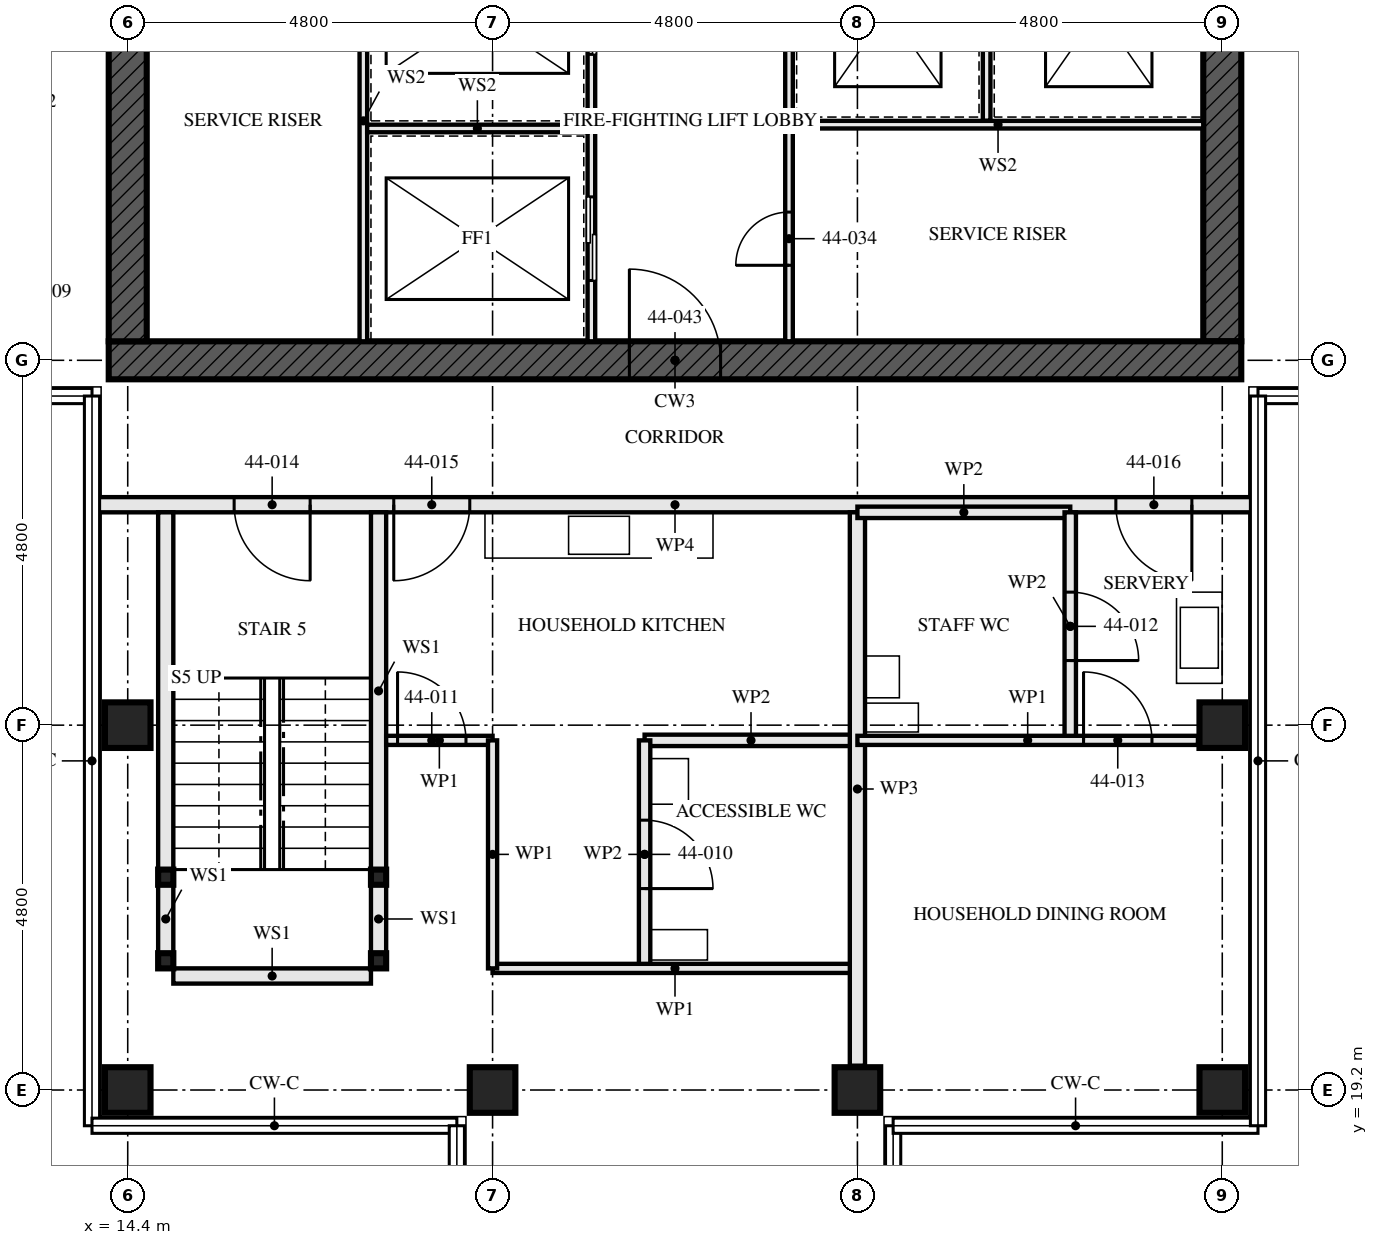
"""IFC4 building model, lengths in metres.
Left out: names, types, materials, properties, quantities, classifications, styles, units other than length and angle.
Written with IfcOpenShell. Run it as: python <this file> out.ifc"""

import sys

from ifc_helpers import new_model, si_unit, direction, frame, frame_2d, origin, origin_2d, place, context, subcontext, project, spatial, rectangle, hollow_rectangle, extrude, element, fill, save


model = new_model("IFC4")
c1 = context("Model", 3, precision=1e-05, world=origin(), true_north=direction((0.0, 1.0)))
c2 = subcontext(c1, "Body", "Model", "MODEL_VIEW")
j1 = project(units=[si_unit("LENGTHUNIT", "METRE"), si_unit("PLANEANGLEUNIT", "RADIAN")], contexts=[c1])
p1 = place(None, origin())
s1 = spatial("IfcSite", under=j1, at=p1, CompositionType="ELEMENT")
p2 = place(p1, origin())
s2 = spatial("IfcBuilding", under=s1, at=p2, CompositionType="ELEMENT")
p3 = place(p2, frame((0.0, 0.0, 162.0)))
s3 = spatial("IfcBuildingStorey", under=s2, at=p3, CompositionType="ELEMENT", Elevation=162.0)
p4 = place(p3, frame((14.4, 19.2, 0.0), z_axis=(0.0, 0.0, 1.0), x_axis=(0.0, 1.0, 0.0)))
e1 = element("IfcColumn", 1, at=p4, inside=s3, PredefinedType="COLUMN", context=c2, shape_type="SweptSolid", body=[
    extrude(hollow_rectangle(XDim=0.6, YDim=0.6, WallThickness=0.06, at=origin_2d()), origin(), (0.0, 0.0, 1.0), 3.5),
])
p5 = place(p3, frame((14.4, 24.0, 0.0), z_axis=(0.0, 0.0, 1.0), x_axis=(1.0, 0.0, 0.0)))
e2 = element("IfcColumn", 2, at=p5, inside=s3, PredefinedType="COLUMN", context=c2, shape_type="SweptSolid", body=[
    extrude(hollow_rectangle(XDim=0.6, YDim=0.6, WallThickness=0.08, at=origin_2d()), origin(), (0.0, 0.0, 1.0), 3.5),
])
for number, where, z_axis, x_axis in (
    (3, (19.2, 19.2, 0.0), (0.0, 0.0, 1.0), (0.0, 1.0, 0.0)),
    (4, (24.0, 19.2, 0.0), (0.0, 0.0, 1.0), (0.0, 1.0, 0.0)),
    (5, (28.8, 19.2, 0.0), (0.0, 0.0, 1.0), (0.0, 1.0, 0.0)),
):
    element("IfcColumn", number, at=place(p3, frame(where, z_axis=z_axis, x_axis=x_axis)), inside=s3, PredefinedType="COLUMN", context=c2, shape_type="SweptSolid", body=[
        extrude(hollow_rectangle(XDim=0.6, YDim=0.6, WallThickness=0.06, at=origin_2d()), origin(), (0.0, 0.0, 1.0), 3.5),
    ])
p6 = place(p3, frame((28.8, 24.0, 0.0), z_axis=(0.0, 0.0, 1.0), x_axis=(1.0, 0.0, 0.0)))
e6 = element("IfcColumn", 6, at=p6, inside=s3, PredefinedType="COLUMN", context=c2, shape_type="SweptSolid", body=[
    extrude(hollow_rectangle(XDim=0.6, YDim=0.6, WallThickness=0.08, at=origin_2d()), origin(), (0.0, 0.0, 1.0), 3.5),
])
p7 = place(p3, frame((14.15, 28.8, -0.17), z_axis=(0.0, 0.0, 1.0), x_axis=(1.0, 0.0, 0.0)))
e7 = element("IfcWall", 7, at=p7, inside=s3, PredefinedType="SHEAR", context=c2, shape_type="SweptSolid", body=[
    extrude(rectangle(XDim=14.9, YDim=0.5, at=frame_2d((7.45, 0.0))), origin(), (0.0, 0.0, 1.0), 3.5),
])
p8 = place(p7, frame((6.85, 0.0, 0.17)))
e8 = element("IfcOpeningElement", 8, at=p8, cuts=e7, PredefinedType="OPENING", context=c2, shape_type="SweptSolid", body=[
    extrude(rectangle(XDim=1.2, YDim=2.1, at=frame_2d((0.6, 1.05))), frame((0.0, 0.26, 0.0), z_axis=(0.0, -1.0, 0.0), x_axis=(1.0, 0.0, 0.0)), (0.0, 0.0, 1.0), 0.521),
])
p9 = place(p3, frame((14.4, 42.95, -0.17), z_axis=(0.0, 0.0, 1.0), x_axis=(0.0, -1.0, 0.0)))
e9 = element("IfcWall", 9, at=p9, inside=s3, PredefinedType="SHEAR", context=c2, shape_type="SweptSolid", body=[
    extrude(rectangle(XDim=13.9, YDim=0.5, at=frame_2d((6.95, 0.0))), origin(), (0.0, 0.0, 1.0), 3.5),
])
p10 = place(p9, frame((6.35, 0.0, 0.17)))
e10 = element("IfcOpeningElement", 10, at=p10, cuts=e9, PredefinedType="OPENING", context=c2, shape_type="SweptSolid", body=[
    extrude(rectangle(XDim=1.2, YDim=2.1, at=frame_2d((0.6, 1.05))), frame((0.0, 0.26, 0.0), z_axis=(0.0, -1.0, 0.0), x_axis=(1.0, 0.0, 0.0)), (0.0, 0.0, 1.0), 0.521),
])
p11 = place(p3, frame((28.8, 29.05, -0.17), z_axis=(0.0, 0.0, 1.0), x_axis=(0.0, 1.0, 0.0)))
e11 = element("IfcWall", 11, at=p11, inside=s3, PredefinedType="SHEAR", context=c2, shape_type="SweptSolid", body=[
    extrude(rectangle(XDim=13.9, YDim=0.5, at=frame_2d((6.95, 0.0))), origin(), (0.0, 0.0, 1.0), 3.5),
])
p12 = place(p11, frame((6.35, 0.0, 0.17)))
e12 = element("IfcOpeningElement", 12, at=p12, cuts=e11, PredefinedType="OPENING", context=c2, shape_type="SweptSolid", body=[
    extrude(rectangle(XDim=1.2, YDim=2.1, at=frame_2d((0.6, 1.05))), frame((0.0, 0.26, 0.0), z_axis=(0.0, -1.0, 0.0), x_axis=(1.0, 0.0, 0.0)), (0.0, 0.0, 1.0), 0.521),
])
for number, where, z_axis, x_axis in (
    (13, (14.9, 20.9, 0.0), (0.0, 0.0, 1.0), (1.0, 0.0, 0.0)),
    (14, (17.7, 20.9, 0.0), (0.0, 0.0, 1.0), (1.0, 0.0, 0.0)),
    (15, (14.9, 22.0, 0.0), (0.0, 0.0, 1.0), (1.0, 0.0, 0.0)),
    (16, (17.7, 22.0, 0.0), (0.0, 0.0, 1.0), (1.0, 0.0, 0.0)),
):
    element("IfcColumn", number, at=place(p3, frame(where, z_axis=z_axis, x_axis=x_axis)), inside=s3, PredefinedType="COLUMN", context=c2, shape_type="SweptSolid", body=[
        extrude(hollow_rectangle(XDim=0.2, YDim=0.2, WallThickness=0.008, at=origin_2d()), origin(), (0.0, 0.0, 1.0), 3.33),
    ])
p13 = place(p3, frame((14.9, 21.0, 0.0), z_axis=(0.0, 0.0, 1.0), x_axis=(0.0, 1.0, 0.0)))
e17 = element("IfcWall", 17, at=p13, inside=s3, PredefinedType="SOLIDWALL", context=c2, shape_type="SweptSolid", body=[
    extrude(rectangle(XDim=0.9, YDim=0.2, at=frame_2d((0.45, 0.0))), origin(), (0.0, 0.0, 1.0), 2.99),
])
p14 = place(p3, frame((14.9, 22.1, 0.0), z_axis=(0.0, 0.0, 1.0), x_axis=(0.0, 1.0, 0.0)))
e18 = element("IfcWall", 18, at=p14, inside=s3, PredefinedType="SOLIDWALL", context=c2, shape_type="SweptSolid", body=[
    extrude(rectangle(XDim=4.7, YDim=0.2, at=frame_2d((2.35, 0.0))), origin(), (0.0, 0.0, 1.0), 2.99),
])
p15 = place(p3, frame((17.7, 21.0, 0.0), z_axis=(0.0, 0.0, 1.0), x_axis=(0.0, 1.0, 0.0)))
e19 = element("IfcWall", 19, at=p15, inside=s3, PredefinedType="SOLIDWALL", context=c2, shape_type="SweptSolid", body=[
    extrude(rectangle(XDim=0.9, YDim=0.2, at=frame_2d((0.45, 0.0))), origin(), (0.0, 0.0, 1.0), 2.99),
])
p16 = place(p3, frame((17.7, 22.1, 0.0), z_axis=(0.0, 0.0, 1.0), x_axis=(0.0, 1.0, 0.0)))
e20 = element("IfcWall", 20, at=p16, inside=s3, PredefinedType="SOLIDWALL", context=c2, shape_type="SweptSolid", body=[
    extrude(rectangle(XDim=4.7, YDim=0.2, at=frame_2d((2.35, 0.0))), origin(), (0.0, 0.0, 1.0), 2.99),
])
p17 = place(p3, frame((15.0, 20.7, 0.0), z_axis=(0.0, 0.0, 1.0), x_axis=(1.0, 0.0, 0.0)))
e21 = element("IfcWall", 21, at=p17, inside=s3, PredefinedType="SOLIDWALL", context=c2, shape_type="SweptSolid", body=[
    extrude(rectangle(XDim=2.6, YDim=0.2, at=frame_2d((1.3, 0.0))), origin(), (0.0, 0.0, 1.0), 3.33),
])
p18 = place(p3, frame((21.2, 20.8, 0.0), z_axis=(0.0, 0.0, 1.0), x_axis=(0.0, 1.0, 0.0)))
e22 = element("IfcWall", 22, at=p18, inside=s3, PredefinedType="PARTITIONING", context=c2, shape_type="SweptSolid", body=[
    extrude(rectangle(XDim=3.0, YDim=0.15, at=frame_2d((1.5, 0.0))), origin(), (0.0, 0.0, 1.0), 3.33),
])
p19 = place(p18, frame((1.05, 0.0, 0.0)))
e23 = element("IfcOpeningElement", 23, at=p19, cuts=e22, PredefinedType="OPENING", context=c2, shape_type="SweptSolid", body=[
    extrude(rectangle(XDim=0.9, YDim=2.1, at=frame_2d((0.45, 1.05))), frame((0.0, 0.085, 0.0), z_axis=(0.0, -1.0, 0.0), x_axis=(1.0, 0.0, 0.0)), (0.0, 0.0, 1.0), 0.171),
])
p20 = place(p3, frame((21.2, 23.8, 0.0), z_axis=(0.0, 0.0, 1.0), x_axis=(1.0, 0.0, 0.0)))
e24 = element("IfcWall", 24, at=p20, inside=s3, PredefinedType="PARTITIONING", context=c2, shape_type="SweptSolid", body=[
    extrude(rectangle(XDim=2.8, YDim=0.15, at=frame_2d((1.4, 0.0))), origin(), (0.0, 0.0, 1.0), 3.33),
])
p21 = place(p3, frame((17.8, 23.8, 0.0), z_axis=(0.0, 0.0, 1.0), x_axis=(1.0, 0.0, 0.0)))
e25 = element("IfcWall", 25, at=p21, inside=s3, PredefinedType="PARTITIONING", context=c2, shape_type="SweptSolid", body=[
    extrude(rectangle(XDim=1.4, YDim=0.12, at=frame_2d((0.7, 0.0))), origin(), (0.0, 0.0, 1.0), 3.33),
])
p22 = place(p21, frame((0.15, 0.0, 0.0)))
e26 = element("IfcOpeningElement", 26, at=p22, cuts=e25, PredefinedType="OPENING", context=c2, shape_type="SweptSolid", body=[
    extrude(rectangle(XDim=0.9, YDim=2.1, at=frame_2d((0.45, 1.05))), frame((0.0, 0.071, 0.0), z_axis=(0.0, -1.0, 0.0), x_axis=(1.0, 0.0, 0.0)), (0.0, 0.0, 1.0), 0.141),
])
p23 = place(p3, frame((19.2, 20.8, 0.0), z_axis=(0.0, 0.0, 1.0), x_axis=(1.0, 0.0, 0.0)))
e27 = element("IfcWall", 27, at=p23, inside=s3, PredefinedType="PARTITIONING", context=c2, shape_type="SweptSolid", body=[
    extrude(rectangle(XDim=4.8, YDim=0.12, at=frame_2d((2.4, 0.0))), origin(), (0.0, 0.0, 1.0), 3.33),
])
p24 = place(p3, frame((19.2, 20.8, 0.0), z_axis=(0.0, 0.0, 1.0), x_axis=(0.0, 1.0, 0.0)))
e28 = element("IfcWall", 28, at=p24, inside=s3, PredefinedType="PARTITIONING", context=c2, shape_type="SweptSolid", body=[
    extrude(rectangle(XDim=3.0, YDim=0.12, at=frame_2d((1.5, 0.0))), origin(), (0.0, 0.0, 1.0), 2.55),
])
p25 = place(p3, frame((24.0, 19.52, 0.0), z_axis=(0.0, 0.0, 1.0), x_axis=(0.0, 1.0, 0.0)))
e29 = element("IfcWall", 29, at=p25, inside=s3, PredefinedType="PARTITIONING", context=c2, shape_type="SweptSolid", body=[
    extrude(rectangle(XDim=7.28, YDim=0.2, at=frame_2d((3.64, 0.0))), origin(), (0.0, 0.0, 1.0), 2.55),
])
p26 = place(p3, frame((26.8, 23.8, 0.0), z_axis=(0.0, 0.0, 1.0), x_axis=(0.0, 1.0, 0.0)))
e30 = element("IfcWall", 30, at=p26, inside=s3, PredefinedType="PARTITIONING", context=c2, shape_type="SweptSolid", body=[
    extrude(rectangle(XDim=3.0, YDim=0.15, at=frame_2d((1.5, 0.0))), origin(), (0.0, 0.0, 1.0), 2.55),
])
p27 = place(p26, frame((1.05, 0.0, 0.0)))
e31 = element("IfcOpeningElement", 31, at=p27, cuts=e30, PredefinedType="OPENING", context=c2, shape_type="SweptSolid", body=[
    extrude(rectangle(XDim=0.9, YDim=2.1, at=frame_2d((0.45, 1.05))), frame((0.0, 0.085, 0.0), z_axis=(0.0, -1.0, 0.0), x_axis=(1.0, 0.0, 0.0)), (0.0, 0.0, 1.0), 0.171),
])
p28 = place(p3, frame((24.0, 26.8, 0.0), z_axis=(0.0, 0.0, 1.0), x_axis=(1.0, 0.0, 0.0)))
e32 = element("IfcWall", 32, at=p28, inside=s3, PredefinedType="PARTITIONING", context=c2, shape_type="SweptSolid", body=[
    extrude(rectangle(XDim=2.8, YDim=0.15, at=frame_2d((1.4, 0.0))), origin(), (0.0, 0.0, 1.0), 3.33),
])
p29 = place(p3, frame((24.0, 23.8, 0.0), z_axis=(0.0, 0.0, 1.0), x_axis=(1.0, 0.0, 0.0)))
e33 = element("IfcWall", 33, at=p29, inside=s3, PredefinedType="PARTITIONING", context=c2, shape_type="SweptSolid", body=[
    extrude(rectangle(XDim=4.48, YDim=0.12, at=frame_2d((2.24, 0.0))), origin(), (0.0, 0.0, 1.0), 3.33),
])
p30 = place(p29, frame((2.975, 0.0, 0.0)))
e34 = element("IfcOpeningElement", 34, at=p30, cuts=e33, PredefinedType="OPENING", context=c2, shape_type="SweptSolid", body=[
    extrude(rectangle(XDim=0.9, YDim=2.1, at=frame_2d((0.45, 1.05))), frame((0.0, 0.071, 0.0), z_axis=(0.0, -1.0, 0.0), x_axis=(1.0, 0.0, 0.0)), (0.0, 0.0, 1.0), 0.141),
])
p31 = place(p3, frame((13.95, 26.9, 0.0), z_axis=(0.0, 0.0, 1.0), x_axis=(1.0, 0.0, 0.0)))
e35 = element("IfcWall", 35, at=p31, inside=s3, PredefinedType="PARTITIONING", context=c2, shape_type="SweptSolid", body=[
    extrude(rectangle(XDim=15.3, YDim=0.2, at=frame_2d((7.65, 0.0))), origin(), (0.0, 0.0, 1.0), 2.32),
])
p32 = place(p31, frame((1.85, 0.0, 0.0)))
e36 = element("IfcOpeningElement", 36, at=p32, cuts=e35, PredefinedType="OPENING", context=c2, shape_type="SweptSolid", body=[
    extrude(rectangle(XDim=1.0, YDim=2.1, at=frame_2d((0.5, 1.05))), frame((0.0, 0.111, 0.0), z_axis=(0.0, -1.0, 0.0), x_axis=(1.0, 0.0, 0.0)), (0.0, 0.0, 1.0), 0.221),
])
p33 = place(p31, frame((3.95, 0.0, 0.0)))
e37 = element("IfcOpeningElement", 37, at=p33, cuts=e35, PredefinedType="OPENING", context=c2, shape_type="SweptSolid", body=[
    extrude(rectangle(XDim=1.0, YDim=2.1, at=frame_2d((0.5, 1.05))), frame((0.0, 0.111, 0.0), z_axis=(0.0, -1.0, 0.0), x_axis=(1.0, 0.0, 0.0)), (0.0, 0.0, 1.0), 0.221),
])
p34 = place(p31, frame((13.45, 0.0, 0.0)))
e38 = element("IfcOpeningElement", 38, at=p34, cuts=e35, PredefinedType="OPENING", context=c2, shape_type="SweptSolid", body=[
    extrude(rectangle(XDim=1.0, YDim=2.1, at=frame_2d((0.5, 1.05))), frame((0.0, 0.111, 0.0), z_axis=(0.0, -1.0, 0.0), x_axis=(1.0, 0.0, 0.0)), (0.0, 0.0, 1.0), 0.221),
])
p35 = place(p3, frame((20.5, 29.05, 0.0), z_axis=(0.0, 0.0, 1.0), x_axis=(0.0, 1.0, 0.0)))
e39 = element("IfcWall", 39, at=p35, inside=s3, PredefinedType="SOLIDWALL", context=c2, shape_type="SweptSolid", body=[
    extrude(rectangle(XDim=5.8, YDim=0.1, at=frame_2d((2.9, 0.0))), origin(), (0.0, 0.0, 1.0), 3.33),
])
p36 = place(p35, frame((0.8, 0.0, 0.0)))
e40 = element("IfcOpeningElement", 40, at=p36, cuts=e39, PredefinedType="OPENING", context=c2, shape_type="SweptSolid", body=[
    extrude(rectangle(XDim=1.1, YDim=2.3, at=frame_2d((0.55, 1.15))), frame((0.0, 0.061, 0.0), z_axis=(0.0, -1.0, 0.0), x_axis=(1.0, 0.0, 0.0)), (0.0, 0.0, 1.0), 0.121),
])
p37 = place(p35, frame((3.775, 0.0, 0.0)))
e41 = element("IfcOpeningElement", 41, at=p37, cuts=e39, PredefinedType="OPENING", context=c2, shape_type="SweptSolid", body=[
    extrude(rectangle(XDim=1.1, YDim=2.3, at=frame_2d((0.55, 1.15))), frame((0.0, 0.061, 0.0), z_axis=(0.0, -1.0, 0.0), x_axis=(1.0, 0.0, 0.0)), (0.0, 0.0, 1.0), 0.121),
])
p38 = place(p3, frame((23.1, 29.05, 0.0), z_axis=(0.0, 0.0, 1.0), x_axis=(0.0, 1.0, 0.0)))
e42 = element("IfcWall", 42, at=p38, inside=s3, PredefinedType="SOLIDWALL", context=c2, shape_type="SweptSolid", body=[
    extrude(rectangle(XDim=5.8, YDim=0.1, at=frame_2d((2.9, 0.0))), origin(), (0.0, 0.0, 1.0), 3.33),
])
p39 = place(p38, frame((1.0, 0.0, 0.0)))
e43 = element("IfcOpeningElement", 43, at=p39, cuts=e42, PredefinedType="OPENING", context=c2, shape_type="SweptSolid", body=[
    extrude(rectangle(XDim=0.7, YDim=2.1, at=frame_2d((0.35, 1.05))), frame((0.0, 0.061, 0.0), z_axis=(0.0, -1.0, 0.0), x_axis=(1.0, 0.0, 0.0)), (0.0, 0.0, 1.0), 0.121),
])
p40 = place(p3, frame((17.5, 29.05, 0.0), z_axis=(0.0, 0.0, 1.0), x_axis=(0.0, 1.0, 0.0)))
e44 = element("IfcWall", 44, at=p40, inside=s3, PredefinedType="SOLIDWALL", context=c2, shape_type="SweptSolid", body=[
    extrude(rectangle(XDim=5.8, YDim=0.1, at=frame_2d((2.9, 0.0))), origin(), (0.0, 0.0, 1.0), 3.33),
])
p41 = place(p3, frame((17.55, 31.85, 0.0), z_axis=(0.0, 0.0, 1.0), x_axis=(1.0, 0.0, 0.0)))
e45 = element("IfcWall", 45, at=p41, inside=s3, PredefinedType="SOLIDWALL", context=c2, shape_type="SweptSolid", body=[
    extrude(rectangle(XDim=2.9, YDim=0.1, at=frame_2d((1.45, 0.0))), origin(), (0.0, 0.0, 1.0), 3.33),
])
p42 = place(p3, frame((25.7, 31.95, 0.0), z_axis=(0.0, 0.0, 1.0), x_axis=(0.0, 1.0, 0.0)))
e46 = element("IfcWall", 46, at=p42, inside=s3, PredefinedType="SOLIDWALL", context=c2, shape_type="SweptSolid", body=[
    extrude(rectangle(XDim=2.9, YDim=0.1, at=frame_2d((1.45, 0.0))), origin(), (0.0, 0.0, 1.0), 3.33),
])
p43 = place(p3, frame((23.15, 31.9, 0.0), z_axis=(0.0, 0.0, 1.0), x_axis=(1.0, 0.0, 0.0)))
e47 = element("IfcWall", 47, at=p43, inside=s3, PredefinedType="SOLIDWALL", context=c2, shape_type="SweptSolid", body=[
    extrude(rectangle(XDim=5.4, YDim=0.1, at=frame_2d((2.7, 0.0))), origin(), (0.0, 0.0, 1.0), 3.33),
])
p44 = place(p19, frame((0.9, 0.0, 0.0), z_axis=(0.0, 0.0, 1.0), x_axis=(-1.0, 0.0, 0.0)))
e48 = element("IfcDoor", 48, at=p44, inside=s3, OperationType="SINGLE_SWING_LEFT", PredefinedType="DOOR", context=c2, shape_type="SweptSolid", body=[
    extrude(rectangle(XDim=0.9, YDim=2.1, at=frame_2d((0.45, 1.05))), frame((0.0, 0.022, 0.0), z_axis=(0.0, -1.0, 0.0), x_axis=(1.0, 0.0, 0.0)), (0.0, 0.0, 1.0), 0.044),
])
fill(e23, e48)
p45 = place(p22, origin())
e49 = element("IfcDoor", 49, at=p45, inside=s3, OperationType="SINGLE_SWING_RIGHT", PredefinedType="DOOR", context=c2, shape_type="SweptSolid", body=[
    extrude(rectangle(XDim=0.9, YDim=2.1, at=frame_2d((0.45, 1.05))), frame((0.0, 0.022, 0.0), z_axis=(0.0, -1.0, 0.0), x_axis=(1.0, 0.0, 0.0)), (0.0, 0.0, 1.0), 0.044),
])
fill(e26, e49)
p46 = place(p27, frame((0.9, 0.0, 0.0), z_axis=(0.0, 0.0, 1.0), x_axis=(-1.0, 0.0, 0.0)))
e50 = element("IfcDoor", 50, at=p46, inside=s3, OperationType="SINGLE_SWING_LEFT", PredefinedType="DOOR", context=c2, shape_type="SweptSolid", body=[
    extrude(rectangle(XDim=0.9, YDim=2.1, at=frame_2d((0.45, 1.05))), frame((0.0, 0.022, 0.0), z_axis=(0.0, -1.0, 0.0), x_axis=(1.0, 0.0, 0.0)), (0.0, 0.0, 1.0), 0.044),
])
fill(e31, e50)
p47 = place(p30, origin())
e51 = element("IfcDoor", 51, at=p47, inside=s3, OperationType="SINGLE_SWING_RIGHT", PredefinedType="DOOR", context=c2, shape_type="SweptSolid", body=[
    extrude(rectangle(XDim=0.9, YDim=2.1, at=frame_2d((0.45, 1.05))), frame((0.0, 0.022, 0.0), z_axis=(0.0, -1.0, 0.0), x_axis=(1.0, 0.0, 0.0)), (0.0, 0.0, 1.0), 0.044),
])
fill(e34, e51)
p48 = place(p32, frame((1.0, 0.0, 0.0), z_axis=(0.0, 0.0, 1.0), x_axis=(-1.0, 0.0, 0.0)))
e52 = element("IfcDoor", 52, at=p48, inside=s3, OperationType="SINGLE_SWING_RIGHT", PredefinedType="DOOR", context=c2, shape_type="SweptSolid", body=[
    extrude(rectangle(XDim=1.0, YDim=2.1, at=frame_2d((0.5, 1.05))), frame((0.0, 0.032, 0.0), z_axis=(0.0, -1.0, 0.0), x_axis=(1.0, 0.0, 0.0)), (0.0, 0.0, 1.0), 0.064),
])
fill(e36, e52)
p49 = place(p33, frame((1.0, 0.0, 0.0), z_axis=(0.0, 0.0, 1.0), x_axis=(-1.0, 0.0, 0.0)))
e53 = element("IfcDoor", 53, at=p49, inside=s3, OperationType="SINGLE_SWING_LEFT", PredefinedType="DOOR", context=c2, shape_type="SweptSolid", body=[
    extrude(rectangle(XDim=1.0, YDim=2.1, at=frame_2d((0.5, 1.05))), frame((0.0, 0.027, 0.0), z_axis=(0.0, -1.0, 0.0), x_axis=(1.0, 0.0, 0.0)), (0.0, 0.0, 1.0), 0.054),
])
fill(e37, e53)
p50 = place(p34, frame((1.0, 0.0, 0.0), z_axis=(0.0, 0.0, 1.0), x_axis=(-1.0, 0.0, 0.0)))
e54 = element("IfcDoor", 54, at=p50, inside=s3, OperationType="SINGLE_SWING_RIGHT", PredefinedType="DOOR", context=c2, shape_type="SweptSolid", body=[
    extrude(rectangle(XDim=1.0, YDim=2.1, at=frame_2d((0.5, 1.05))), frame((0.0, 0.027, 0.0), z_axis=(0.0, -1.0, 0.0), x_axis=(1.0, 0.0, 0.0)), (0.0, 0.0, 1.0), 0.054),
])
fill(e38, e54)
p51 = place(p36, origin())
e55 = element("IfcDoor", 55, at=p51, inside=s3, OperationType="SLIDING_TO_LEFT", PredefinedType="DOOR", context=c2, shape_type="SweptSolid", body=[
    extrude(rectangle(XDim=1.1, YDim=2.3, at=frame_2d((0.55, 1.15))), frame((0.0, 0.05, 0.0), z_axis=(0.0, -1.0, 0.0), x_axis=(1.0, 0.0, 0.0)), (0.0, 0.0, 1.0), 0.1),
])
fill(e40, e55)
p52 = place(p37, origin())
e56 = element("IfcDoor", 56, at=p52, inside=s3, OperationType="SLIDING_TO_LEFT", PredefinedType="DOOR", context=c2, shape_type="SweptSolid", body=[
    extrude(rectangle(XDim=1.1, YDim=2.3, at=frame_2d((0.55, 1.15))), frame((0.0, 0.05, 0.0), z_axis=(0.0, -1.0, 0.0), x_axis=(1.0, 0.0, 0.0)), (0.0, 0.0, 1.0), 0.1),
])
fill(e41, e56)
p53 = place(p39, origin())
e57 = element("IfcDoor", 57, at=p53, inside=s3, OperationType="SINGLE_SWING_RIGHT", PredefinedType="DOOR", context=c2, shape_type="SweptSolid", body=[
    extrude(rectangle(XDim=0.7, YDim=2.1, at=frame_2d((0.35, 1.05))), frame((0.0, 0.027, 0.0), z_axis=(0.0, -1.0, 0.0), x_axis=(1.0, 0.0, 0.0)), (0.0, 0.0, 1.0), 0.054),
])
fill(e43, e57)
p54 = place(p8, origin())
e58 = element("IfcDoor", 58, at=p54, inside=s3, OperationType="SINGLE_SWING_LEFT", PredefinedType="DOOR", context=c2, shape_type="SweptSolid", body=[
    extrude(rectangle(XDim=1.2, YDim=2.1, at=frame_2d((0.6, 1.05))), frame((0.0, 0.027, 0.0), z_axis=(0.0, -1.0, 0.0), x_axis=(1.0, 0.0, 0.0)), (0.0, 0.0, 1.0), 0.054),
])
fill(e8, e58)
save(model, sys.argv[1])
